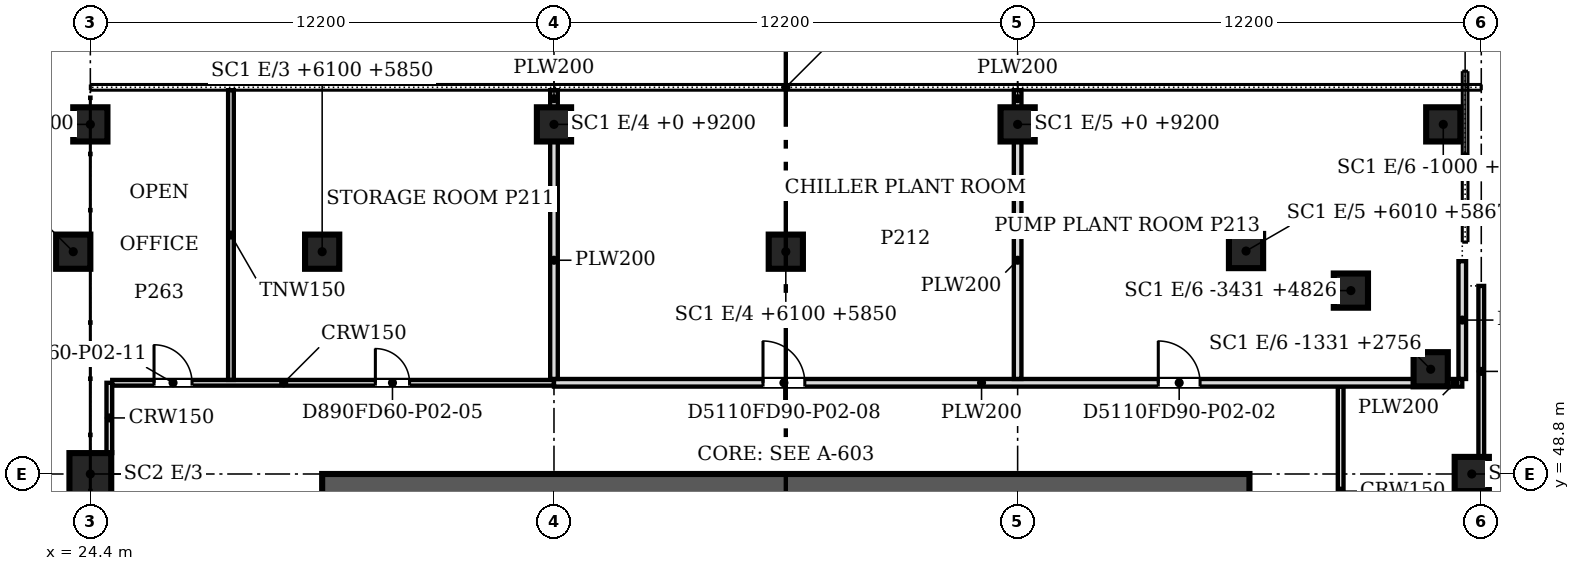
"""IFC4 building model, lengths in metres.
Left out: names, types, materials, properties, quantities, classifications, styles, units other than length and angle.
Written with IfcOpenShell. Run it as: python <this file> out.ifc"""

import sys

from ifc_helpers import new_model, si_unit, direction, frame, frame_2d, origin, origin_2d, place, context, subcontext, project, spatial, rectangle, extrude, source, transform, mapped, element, fill, save


model = new_model("IFC4")
c1 = context("Model", 3, precision=1e-05, world=origin(), true_north=direction((0.0, 1.0)))
c2 = subcontext(c1, "Body", "Model", "MODEL_VIEW")
j1 = project(units=[si_unit("LENGTHUNIT", "METRE"), si_unit("PLANEANGLEUNIT", "RADIAN")], contexts=[c1])
p1 = place(None, origin())
s1 = spatial("IfcSite", under=j1, at=p1, CompositionType="ELEMENT")
p2 = place(p1, origin())
s2 = spatial("IfcBuilding", under=s1, at=p2, CompositionType="ELEMENT")
p3 = place(p2, frame((0.0, 0.0, 7.2)))
s3 = spatial("IfcBuildingStorey", under=s2, at=p3, CompositionType="ELEMENT", Elevation=7.2)
for number, where, z_axis, x_axis in (
    (1, (23.95, 54.65, 0.0), (0.0, 0.0, 1.0), (1.0, 0.0, 0.0)),
    (2, (60.75, 48.8, 0.0), (0.0, 0.0, 1.0), (1.0, 0.0, 0.0)),
    (3, (59.669, 51.556, 0.0), (0.0, 0.0, 1.0), (1.0, 0.0, 0.0)),
    (4, (57.569, 53.626, 0.0), (0.0, 0.0, 1.0), (1.0, 0.0, 0.0)),
    (5, (54.81, 54.667, 0.0), (0.0, 0.0, 1.0), (1.0, 0.0, 0.0)),
    (6, (42.7, 54.65, 0.0), (0.0, 0.0, 1.0), (1.0, 0.0, 0.0)),
    (7, (30.5, 54.65, 0.0), (0.0, 0.0, 1.0), (1.0, 0.0, 0.0)),
):
    element("IfcColumn", number, at=place(p3, frame(where, z_axis=z_axis, x_axis=x_axis)), inside=s3, PredefinedType="COLUMN", context=c2, shape_type="SweptSolid", body=[
        extrude(rectangle(XDim=0.9, YDim=0.9, at=origin_2d()), origin(), (0.0, 0.0, 1.0), 4.55),
    ])
p4 = place(p3, frame((24.4, 48.8, 0.0), z_axis=(0.0, 0.0, 1.0), x_axis=(1.0, 0.0, 0.0)))
e8 = element("IfcColumn", 8, at=p4, inside=s3, PredefinedType="COLUMN", context=c2, shape_type="SweptSolid", body=[
    extrude(rectangle(XDim=1.1, YDim=1.1, at=origin_2d()), origin(), (0.0, 0.0, 1.0), 4.55),
])
for number, where, z_axis, x_axis in (
    (9, (24.4, 58.0, 0.0), (0.0, 0.0, 1.0), (1.0, 0.0, 0.0)),
    (10, (36.6, 58.0, 0.0), (0.0, 0.0, 1.0), (1.0, 0.0, 0.0)),
    (11, (48.8, 58.0, 0.0), (0.0, 0.0, 1.0), (1.0, 0.0, 0.0)),
    (12, (61.0, 54.2, 0.0), (0.0, 0.0, 1.0), (1.0, 0.0, 0.0)),
    (13, (60.0, 58.0, 0.0), (0.0, 0.0, 1.0), (1.0, 0.0, 0.0)),
):
    element("IfcColumn", number, at=place(p3, frame(where, z_axis=z_axis, x_axis=x_axis)), inside=s3, PredefinedType="COLUMN", context=c2, shape_type="SweptSolid", body=[
        extrude(rectangle(XDim=0.9, YDim=0.9, at=origin_2d()), origin(), (0.0, 0.0, 1.0), 4.55),
    ])
p5 = place(p3, frame((30.5, 48.35, 0.0), z_axis=(0.0, 0.0, 1.0), x_axis=(1.0, 0.0, 0.0)))
e14 = element("IfcWall", 14, at=p5, inside=s3, PredefinedType="SHEAR", context=c2, shape_type="SweptSolid", body=[
    extrude(rectangle(XDim=24.4, YDim=0.9, at=frame_2d((12.2, 0.0))), origin(), (0.0, 0.0, 1.0), 4.8),
])
p6 = place(p3, frame((57.3, 51.099, 0.0), z_axis=(0.0, 0.0, 1.0), x_axis=(0.0, -1.0, 0.0)))
e15 = element("IfcWall", 15, at=p6, inside=s3, PredefinedType="PARTITIONING", context=c2, shape_type="SweptSolid", body=[
    extrude(rectangle(XDim=11.999, YDim=0.15, at=frame_2d((6.0, 0.0))), origin(), (0.0, 0.0, 1.0), 3.715),
])
m1 = source(origin(), c2, "Body", "SweptSolid", [
    extrude(rectangle(XDim=1.0, YDim=2.1, at=frame_2d((0.5, 1.05))), frame((0.0, 0.085, 0.0), z_axis=(0.0, -1.0, 0.0), x_axis=(1.0, 0.0, 0.0)), (0.0, 0.0, 1.0), 0.17),
])
p7 = place(p6, frame((5.499, 0.0, 0.0)))
e16 = element("IfcOpeningElement", 16, at=p7, cuts=e15, PredefinedType="OPENING", context=c2, shape_type="MappedRepresentation", body=[
    mapped(m1, transform((0.0, 0.0, 0.0), scale=1.0)),
])
p8 = place(p3, frame((61.201, 48.8, 0.0), z_axis=(0.0, 0.0, 1.0), x_axis=(1.0, 0.0, 0.0)))
e17 = element("IfcWall", 17, at=p8, inside=s3, PredefinedType="PARTITIONING", context=c2, shape_type="SweptSolid", body=[
    extrude(rectangle(XDim=7.223, YDim=0.1, at=frame_2d((3.612, 0.0))), origin(), (0.0, 0.0, 1.0), 3.715),
])
m2 = source(origin(), c2, "Body", "SweptSolid", [
    extrude(rectangle(XDim=0.9, YDim=2.1, at=frame_2d((0.45, 1.05))), frame((0.0, 0.06, 0.0), z_axis=(0.0, -1.0, 0.0), x_axis=(1.0, 0.0, 0.0)), (0.0, 0.0, 1.0), 0.12),
])
p9 = place(p8, frame((3.2, 0.0, 0.0)))
e18 = element("IfcOpeningElement", 18, at=p9, cuts=e17, PredefinedType="OPENING", context=c2, shape_type="MappedRepresentation", body=[
    mapped(m2, transform((0.0, 0.0, 0.0), scale=1.0)),
])
p10 = place(p3, frame((61.0, 49.251, 0.0), z_axis=(0.0, 0.0, 1.0), x_axis=(0.0, 1.0, 0.0)))
e19 = element("IfcWall", 19, at=p10, inside=s3, PredefinedType="PARTITIONING", context=c2, shape_type="SweptSolid", body=[
    extrude(rectangle(XDim=4.498, YDim=0.15, at=frame_2d((2.249, 0.0))), origin(), (0.0, 0.0, 1.0), 3.715),
])
p11 = place(p3, frame((24.9, 49.351, 0.0), z_axis=(0.0, 0.0, 1.0), x_axis=(0.0, 1.0, 0.0)))
e20 = element("IfcWall", 20, at=p11, inside=s3, PredefinedType="PARTITIONING", context=c2, shape_type="SweptSolid", body=[
    extrude(rectangle(XDim=1.849, YDim=0.15, at=frame_2d((0.924, 0.0))), origin(), (0.0, 0.0, 1.0), 3.715),
])
p12 = place(p3, frame((24.976, 51.2, 0.0), z_axis=(0.0, 0.0, 1.0), x_axis=(1.0, 0.0, 0.0)))
e21 = element("IfcWall", 21, at=p12, inside=s3, PredefinedType="PARTITIONING", context=c2, shape_type="SweptSolid", body=[
    extrude(rectangle(XDim=11.623, YDim=0.15, at=frame_2d((5.812, 0.0))), origin(), (0.0, 0.0, 1.0), 3.715),
])
m3 = source(origin(), c2, "Body", "SweptSolid", [
    extrude(rectangle(XDim=0.9, YDim=2.1, at=frame_2d((0.45, 1.05))), frame((0.0, 0.085, 0.0), z_axis=(0.0, -1.0, 0.0), x_axis=(1.0, 0.0, 0.0)), (0.0, 0.0, 1.0), 0.17),
])
p13 = place(p12, frame((6.924, 0.0, 0.0)))
e22 = element("IfcOpeningElement", 22, at=p13, cuts=e21, PredefinedType="OPENING", context=c2, shape_type="MappedRepresentation", body=[
    mapped(m3, transform((0.0, 0.0, 0.0), scale=1.0)),
])
p14 = place(p12, frame((1.1, 0.0, 0.0)))
e23 = element("IfcOpeningElement", 23, at=p14, cuts=e21, PredefinedType="OPENING", context=c2, shape_type="MappedRepresentation", body=[
    mapped(m1, transform((0.0, 0.0, 0.0), scale=1.0)),
])
p15 = place(p3, frame((36.6, 51.2, 0.0), z_axis=(0.0, 0.0, 1.0), x_axis=(1.0, 0.0, 0.0)))
e24 = element("IfcWall", 24, at=p15, inside=s3, PredefinedType="PARTITIONING", context=c2, shape_type="SweptSolid", body=[
    extrude(rectangle(XDim=22.618, YDim=0.2, at=frame_2d((11.309, 0.0))), origin(), (0.0, 0.0, 1.0), 3.715),
])
m4 = source(origin(), c2, "Body", "SweptSolid", [
    extrude(rectangle(XDim=1.1, YDim=2.1, at=frame_2d((0.55, 1.05))), frame((0.0, 0.11, 0.0), z_axis=(0.0, -1.0, 0.0), x_axis=(1.0, 0.0, 0.0)), (0.0, 0.0, 1.0), 0.22),
])
p16 = place(p15, frame((15.901, 0.0, 0.0)))
e25 = element("IfcOpeningElement", 25, at=p16, cuts=e24, PredefinedType="OPENING", context=c2, shape_type="MappedRepresentation", body=[
    mapped(m4, transform((0.0, 0.0, 0.0), scale=1.0)),
])
p17 = place(p15, frame((5.5, 0.0, 0.0)))
e26 = element("IfcOpeningElement", 26, at=p17, cuts=e24, PredefinedType="OPENING", context=c2, shape_type="MappedRepresentation", body=[
    mapped(m4, transform((0.0, 0.0, 0.0), scale=1.0)),
])
p18 = place(p3, frame((60.12, 51.2, 0.0), z_axis=(0.0, 0.0, 1.0), x_axis=(1.0, 0.0, 0.0)))
e27 = element("IfcWall", 27, at=p18, inside=s3, PredefinedType="PARTITIONING", context=c2, shape_type="SweptSolid", body=[
    extrude(rectangle(XDim=0.38, YDim=0.2, at=frame_2d((0.19, 0.0))), origin(), (0.0, 0.0, 1.0), 3.715),
])
p19 = place(p3, frame((28.1, 51.276, 0.0), z_axis=(0.0, 0.0, 1.0), x_axis=(0.0, 1.0, 0.0)))
e28 = element("IfcWall", 28, at=p19, inside=s3, PredefinedType="PARTITIONING", context=c2, shape_type="SweptSolid", body=[
    extrude(rectangle(XDim=7.624, YDim=0.15, at=frame_2d((3.812, 0.0))), origin(), (0.0, 0.0, 1.0), 3.715),
])
for number, where, z_axis, x_axis in (
    (29, (36.6, 51.301, 0.0), (0.0, 0.0, 1.0), (0.0, 1.0, 0.0)),
    (30, (48.8, 51.301, 0.0), (0.0, 0.0, 1.0), (0.0, 1.0, 0.0)),
):
    element("IfcWall", number, at=place(p3, frame(where, z_axis=z_axis, x_axis=x_axis)), inside=s3, PredefinedType="PARTITIONING", context=c2, shape_type="SweptSolid", body=[
        extrude(rectangle(XDim=6.248, YDim=0.2, at=frame_2d((3.124, 0.0))), origin(), (0.0, 0.0, 1.0), 3.715),
    ])
p20 = place(p3, frame((60.5, 51.301, 0.0), z_axis=(0.0, 0.0, 1.0), x_axis=(0.0, 1.0, 0.0)))
e31 = element("IfcWall", 31, at=p20, inside=s3, PredefinedType="PARTITIONING", context=c2, shape_type="SweptSolid", body=[
    extrude(rectangle(XDim=3.099, YDim=0.2, at=frame_2d((1.549, 0.0))), origin(), (0.0, 0.0, 1.0), 3.715),
])
for number, where, z_axis, x_axis in (
    (32, (36.6, 58.451, 0.0), (0.0, 0.0, 1.0), (0.0, 1.0, 0.0)),
    (33, (48.8, 58.451, 0.0), (0.0, 0.0, 1.0), (0.0, 1.0, 0.0)),
):
    element("IfcWall", number, at=place(p3, frame(where, z_axis=z_axis, x_axis=x_axis)), inside=s3, PredefinedType="PARTITIONING", context=c2, shape_type="SweptSolid", body=[
        extrude(rectangle(XDim=0.449, YDim=0.2, at=frame_2d((0.225, 0.0))), origin(), (0.0, 0.0, 1.0), 3.715),
    ])
m5 = source(origin(), c2, "Body", "SweptSolid", [
    extrude(rectangle(XDim=0.9, YDim=2.1, at=frame_2d((0.45, 1.05))), frame((0.0, 0.025, 0.0), z_axis=(0.0, -1.0, 0.0), x_axis=(1.0, 0.0, 0.0)), (0.0, 0.0, 1.0), 0.05),
])
p21 = place(p13, origin())
e34 = element("IfcDoor", 34, at=p21, inside=s3, OperationType="SINGLE_SWING_LEFT", PredefinedType="DOOR", context=c2, shape_type="MappedRepresentation", body=[
    mapped(m5, transform((0.0, 0.0, 0.0), scale=1.0)),
])
fill(e22, e34)
m6 = source(origin(), c2, "Body", "SweptSolid", [
    extrude(rectangle(XDim=1.1, YDim=2.1, at=frame_2d((0.55, 1.05))), frame((0.0, 0.025, 0.0), z_axis=(0.0, -1.0, 0.0), x_axis=(1.0, 0.0, 0.0)), (0.0, 0.0, 1.0), 0.05),
])
p22 = place(p16, origin())
e35 = element("IfcDoor", 35, at=p22, inside=s3, OperationType="SINGLE_SWING_LEFT", PredefinedType="DOOR", context=c2, shape_type="MappedRepresentation", body=[
    mapped(m6, transform((0.0, 0.0, 0.0), scale=1.0)),
])
fill(e25, e35)
p23 = place(p17, origin())
e36 = element("IfcDoor", 36, at=p23, inside=s3, OperationType="SINGLE_SWING_LEFT", PredefinedType="DOOR", context=c2, shape_type="MappedRepresentation", body=[
    mapped(m6, transform((0.0, 0.0, 0.0), scale=1.0)),
])
fill(e26, e36)
m7 = source(origin(), c2, "Body", "SweptSolid", [
    extrude(rectangle(XDim=1.0, YDim=2.1, at=frame_2d((0.5, 1.05))), frame((0.0, 0.025, 0.0), z_axis=(0.0, -1.0, 0.0), x_axis=(1.0, 0.0, 0.0)), (0.0, 0.0, 1.0), 0.05),
])
p24 = place(p14, origin())
e37 = element("IfcDoor", 37, at=p24, inside=s3, OperationType="SINGLE_SWING_LEFT", PredefinedType="DOOR", context=c2, shape_type="MappedRepresentation", body=[
    mapped(m7, transform((0.0, 0.0, 0.0), scale=1.0)),
])
fill(e23, e37)
save(model, sys.argv[1])
